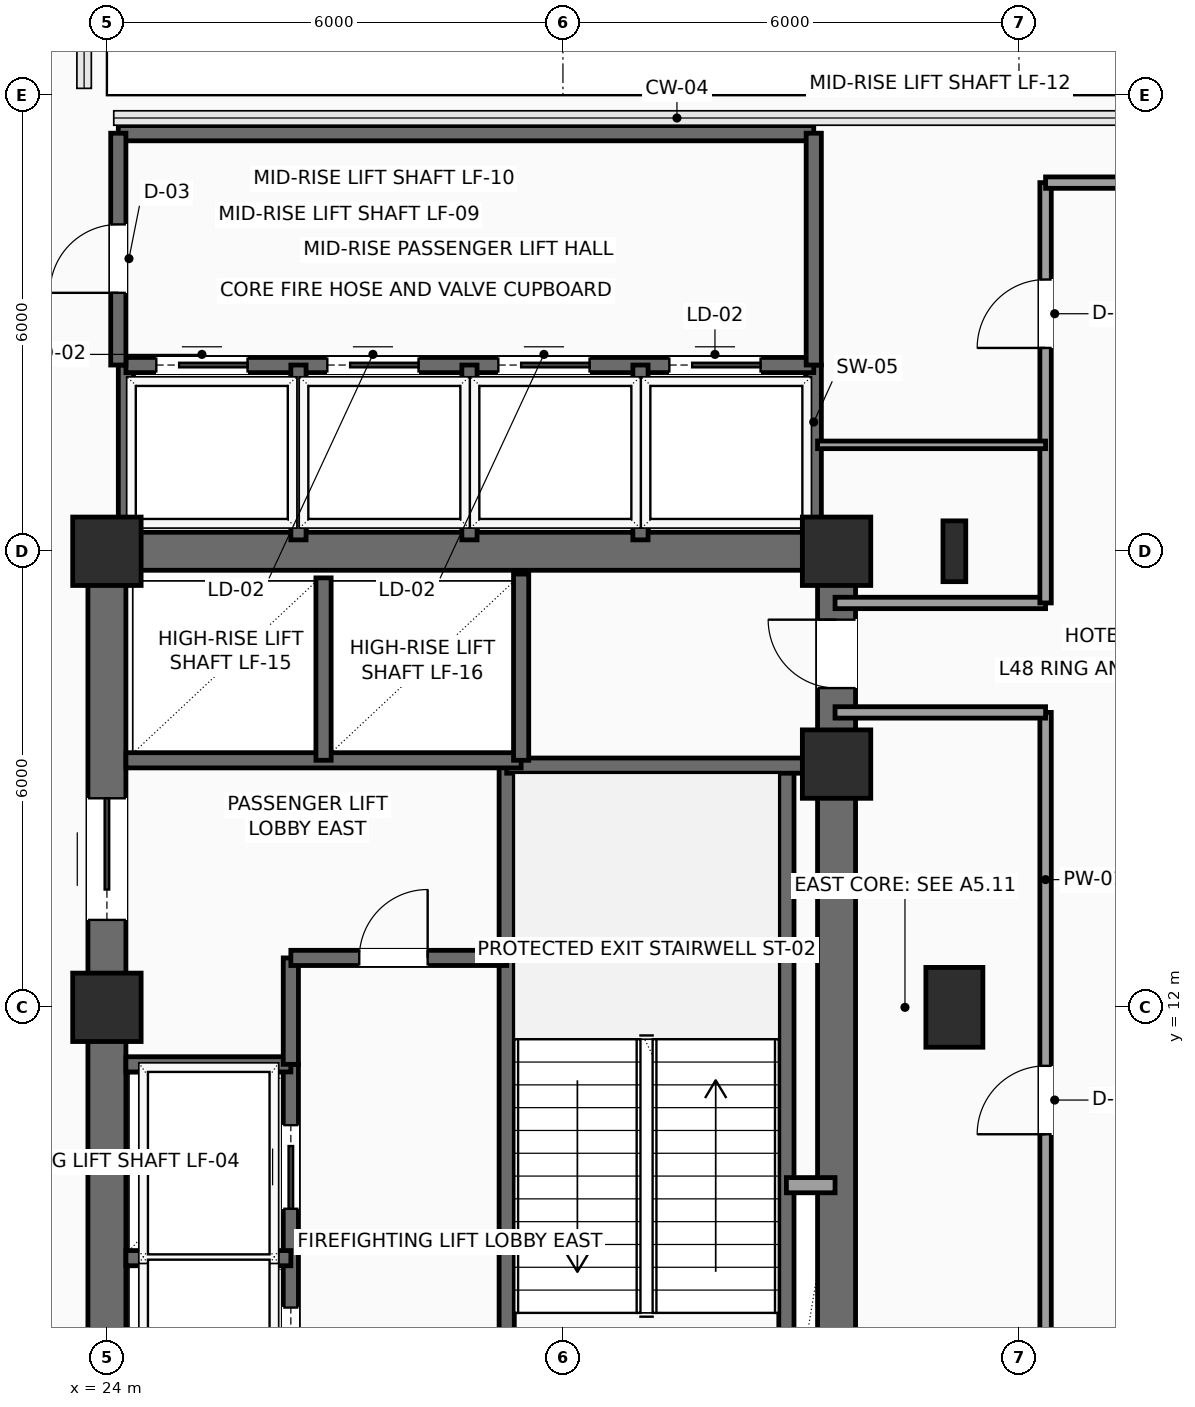
"""IFC4 building model, lengths in metres.
Left out: names, types, materials, properties, quantities, classifications, styles, units other than length and angle.
Written with IfcOpenShell. Run it as: python <this file> out.ifc"""

import sys

from ifc_helpers import new_model, si_unit, direction, frame, frame_2d, origin, origin_2d, place, context, subcontext, project, spatial, rectangle, i_section, extrude, element, fill, save


model = new_model("IFC4")
c1 = context("Model", 3, precision=1e-05, world=origin(), true_north=direction((0.0, 1.0)))
c2 = subcontext(c1, "Body", "Model", "MODEL_VIEW")
j1 = project(units=[si_unit("LENGTHUNIT", "METRE"), si_unit("PLANEANGLEUNIT", "RADIAN")], contexts=[c1])
p1 = place(None, origin())
s1 = spatial("IfcSite", under=j1, at=p1, CompositionType="ELEMENT")
p2 = place(p1, origin())
s2 = spatial("IfcBuilding", under=s1, at=p2, CompositionType="ELEMENT")
p3 = place(p2, frame((0.0, 0.0, 195.45)))
s3 = spatial("IfcBuildingStorey", under=s2, at=p3, CompositionType="ELEMENT", Elevation=195.45)
for number, where, z_axis, x_axis in (
    (1, (24.0, 12.0, 0.0), (0.0, 0.0, 1.0), (1.0, 0.0, 0.0)),
    (2, (24.0, 18.0, 0.0), (0.0, 0.0, 1.0), (1.0, 0.0, 0.0)),
    (3, (33.6, 15.2, 0.0), (0.0, 0.0, 1.0), (1.0, 0.0, 0.0)),
    (4, (33.6, 18.0, 0.0), (0.0, 0.0, 1.0), (1.0, 0.0, 0.0)),
):
    element("IfcColumn", number, at=place(p3, frame(where, z_axis=z_axis, x_axis=x_axis)), inside=s3, PredefinedType="COLUMN", context=c2, shape_type="SweptSolid", body=[
        extrude(rectangle(XDim=0.9, YDim=0.9, at=origin_2d()), origin(), (0.0, 0.0, 1.0), 3.75),
    ])
p4 = place(p3, frame((35.15, 12.0, 0.0), z_axis=(0.0, 0.0, 1.0), x_axis=(1.0, 0.0, 0.0)))
e5 = element("IfcColumn", 5, at=p4, inside=s3, PredefinedType="COLUMN", context=c2, shape_type="SweptSolid", body=[
    extrude(rectangle(XDim=0.75, YDim=1.05, at=origin_2d()), origin(), (0.0, 0.0, 1.0), 3.75),
])
p5 = place(p3, frame((35.15, 18.0, 0.0), z_axis=(0.0, 0.0, 1.0), x_axis=(1.0, 0.0, 0.0)))
e6 = element("IfcColumn", 6, at=p5, inside=s3, PredefinedType="COLUMN", context=c2, shape_type="SweptSolid", body=[
    extrude(i_section(OverallWidth=0.3, OverallDepth=0.8, WebThickness=0.018, FlangeThickness=0.033, FilletRadius=0.03, at=origin_2d()), origin(), (0.0, 0.0, 1.0), 3.75),
])
p6 = place(p3, frame((24.0, 18.0, 0.0), z_axis=(0.0, 0.0, 1.0), x_axis=(1.0, 0.0, 0.0)))
e7 = element("IfcWall", 7, at=p6, inside=s3, PredefinedType="SHEAR", context=c2, shape_type="SweptSolid", body=[
    extrude(rectangle(XDim=9.6, YDim=0.5, at=frame_2d((4.8, 0.0))), origin(), (0.0, 0.0, 1.0), 3.475),
])
p7 = place(p3, frame((24.0, 6.0, 0.0), z_axis=(0.0, 0.0, 1.0), x_axis=(0.0, 1.0, 0.0)))
e8 = element("IfcWall", 8, at=p7, inside=s3, PredefinedType="SHEAR", context=c2, shape_type="SweptSolid", body=[
    extrude(rectangle(XDim=12.0, YDim=0.5, at=frame_2d((6.0, 0.0))), origin(), (0.0, 0.0, 1.0), 3.475),
])
p8 = place(p7, frame((7.15, 0.0, 0.0)))
e9 = element("IfcOpeningElement", 9, at=p8, cuts=e8, PredefinedType="OPENING", context=c2, shape_type="SweptSolid", body=[
    extrude(rectangle(XDim=1.6, YDim=2.3, at=frame_2d((0.8, 1.15))), frame((0.0, 0.26, 0.0), z_axis=(0.0, -1.0, 0.0), x_axis=(1.0, 0.0, 0.0)), (0.0, 0.0, 1.0), 0.52),
])
p9 = place(p3, frame((33.6, 6.0, 0.0), z_axis=(0.0, 0.0, 1.0), x_axis=(0.0, 1.0, 0.0)))
e10 = element("IfcWall", 10, at=p9, inside=s3, PredefinedType="SHEAR", context=c2, shape_type="SweptSolid", body=[
    extrude(rectangle(XDim=12.0, YDim=0.5, at=frame_2d((6.0, 0.0))), origin(), (0.0, 0.0, 1.0), 3.475),
])
p10 = place(p9, frame((10.2, 0.0, 0.0)))
e11 = element("IfcOpeningElement", 11, at=p10, cuts=e10, PredefinedType="OPENING", context=c2, shape_type="SweptSolid", body=[
    extrude(rectangle(XDim=0.9, YDim=2.15, at=frame_2d((0.45, 1.075))), frame((0.0, 0.26, 0.0), z_axis=(0.0, -1.0, 0.0), x_axis=(1.0, 0.0, 0.0)), (0.0, 0.0, 1.0), 0.52),
])
p11 = place(p3, frame((29.26, 6.3, 0.0), z_axis=(0.0, 0.0, 1.0), x_axis=(0.0, 1.0, 0.0)))
e12 = element("IfcWall", 12, at=p11, inside=s3, PredefinedType="SHEAR", context=c2, shape_type="SweptSolid", body=[
    extrude(rectangle(XDim=8.88, YDim=0.2, at=frame_2d((4.44, 0.0))), origin(), (0.0, 0.0, 1.0), 3.475),
])
p12 = place(p11, frame((0.35, 0.0, 0.0)))
e13 = element("IfcOpeningElement", 13, at=p12, cuts=e12, PredefinedType="OPENING", context=c2, shape_type="SweptSolid", body=[
    extrude(rectangle(XDim=1.1, YDim=2.2, at=frame_2d((0.55, 1.1))), frame((0.0, 0.11, 0.0), z_axis=(0.0, -1.0, 0.0), x_axis=(1.0, 0.0, 0.0)), (0.0, 0.0, 1.0), 0.22),
])
p13 = place(p3, frame((32.94, 6.3, 0.0), z_axis=(0.0, 0.0, 1.0), x_axis=(0.0, 1.0, 0.0)))
e14 = element("IfcWall", 14, at=p13, inside=s3, PredefinedType="SHEAR", context=c2, shape_type="SweptSolid", body=[
    extrude(rectangle(XDim=8.88, YDim=0.2, at=frame_2d((4.44, 0.0))), origin(), (0.0, 0.0, 1.0), 3.475),
])
p14 = place(p3, frame((29.26, 15.18, 0.0), z_axis=(0.0, 0.0, 1.0), x_axis=(1.0, 0.0, 0.0)))
e15 = element("IfcWall", 15, at=p14, inside=s3, PredefinedType="SHEAR", context=c2, shape_type="SweptSolid", body=[
    extrude(rectangle(XDim=4.04, YDim=0.2, at=frame_2d((2.02, 0.0))), origin(), (0.0, 0.0, 1.0), 3.475),
])
p15 = place(p3, frame((26.42, 6.3, 0.0), z_axis=(0.0, 0.0, 1.0), x_axis=(0.0, 1.0, 0.0)))
e16 = element("IfcWall", 16, at=p15, inside=s3, PredefinedType="SHEAR", context=c2, shape_type="SweptSolid", body=[
    extrude(rectangle(XDim=4.95, YDim=0.2, at=frame_2d((2.475, 0.0))), origin(), (0.0, 0.0, 1.0), 3.475),
])
p16 = place(p15, frame((0.65, 0.0, 0.0)))
e17 = element("IfcOpeningElement", 17, at=p16, cuts=e16, PredefinedType="OPENING", context=c2, shape_type="SweptSolid", body=[
    extrude(rectangle(XDim=1.1, YDim=2.2, at=frame_2d((0.55, 1.1))), frame((0.0, 0.11, 0.0), z_axis=(0.0, -1.0, 0.0), x_axis=(1.0, 0.0, 0.0)), (0.0, 0.0, 1.0), 0.22),
])
p17 = place(p15, frame((3.05, 0.0, 0.0)))
e18 = element("IfcOpeningElement", 18, at=p17, cuts=e16, PredefinedType="OPENING", context=c2, shape_type="SweptSolid", body=[
    extrude(rectangle(XDim=1.1, YDim=2.2, at=frame_2d((0.55, 1.1))), frame((0.0, 0.11, 0.0), z_axis=(0.0, -1.0, 0.0), x_axis=(1.0, 0.0, 0.0)), (0.0, 0.0, 1.0), 0.22),
])
for number, where, z_axis, x_axis in (
    (19, (24.25, 8.7, 0.0), (0.0, 0.0, 1.0), (1.0, 0.0, 0.0)),
    (20, (24.25, 11.25, 0.0), (0.0, 0.0, 1.0), (1.0, 0.0, 0.0)),
):
    element("IfcWall", number, at=place(p3, frame(where, z_axis=z_axis, x_axis=x_axis)), inside=s3, PredefinedType="SHEAR", context=c2, shape_type="SweptSolid", body=[
        extrude(rectangle(XDim=2.17, YDim=0.2, at=frame_2d((1.085, 0.0))), origin(), (0.0, 0.0, 1.0), 3.475),
    ])
p18 = place(p3, frame((26.42, 11.25, 0.0), z_axis=(0.0, 0.0, 1.0), x_axis=(0.0, 1.0, 0.0)))
e21 = element("IfcWall", 21, at=p18, inside=s3, PredefinedType="SHEAR", context=c2, shape_type="SweptSolid", body=[
    extrude(rectangle(XDim=1.4, YDim=0.2, at=frame_2d((0.7, 0.0))), origin(), (0.0, 0.0, 1.0), 3.475),
])
p19 = place(p3, frame((26.42, 12.65, 0.0), z_axis=(0.0, 0.0, 1.0), x_axis=(1.0, 0.0, 0.0)))
e22 = element("IfcWall", 22, at=p19, inside=s3, PredefinedType="SHEAR", context=c2, shape_type="SweptSolid", body=[
    extrude(rectangle(XDim=2.84, YDim=0.2, at=frame_2d((1.42, 0.0))), origin(), (0.0, 0.0, 1.0), 3.475),
])
p20 = place(p19, frame((0.9, 0.0, 0.0)))
e23 = element("IfcOpeningElement", 23, at=p20, cuts=e22, PredefinedType="OPENING", context=c2, shape_type="SweptSolid", body=[
    extrude(rectangle(XDim=0.9, YDim=2.15, at=frame_2d((0.45, 1.075))), frame((0.0, 0.11, 0.0), z_axis=(0.0, -1.0, 0.0), x_axis=(1.0, 0.0, 0.0)), (0.0, 0.0, 1.0), 0.22),
])
p21 = place(p3, frame((32.94, 9.66, 0.0), z_axis=(0.0, 0.0, 1.0), x_axis=(1.0, 0.0, 0.0)))
e24 = element("IfcWall", 24, at=p21, inside=s3, PredefinedType="SOLIDWALL", context=c2, shape_type="SweptSolid", body=[
    extrude(rectangle(XDim=0.64, YDim=0.2, at=frame_2d((0.32, 0.0))), origin(), (0.0, 0.0, 1.0), 3.475),
])
p22 = place(p3, frame((24.25, 15.25, 0.0), z_axis=(0.0, 0.0, 1.0), x_axis=(1.0, 0.0, 0.0)))
e25 = element("IfcWall", 25, at=p22, inside=s3, PredefinedType="SHEAR", context=c2, shape_type="SweptSolid", body=[
    extrude(rectangle(XDim=5.2, YDim=0.2, at=frame_2d((2.6, 0.0))), origin(), (0.0, 0.0, 1.0), 3.475),
])
p23 = place(p3, frame((26.85, 15.25, 0.0), z_axis=(0.0, 0.0, 1.0), x_axis=(0.0, 1.0, 0.0)))
e26 = element("IfcWall", 26, at=p23, inside=s3, PredefinedType="SHEAR", context=c2, shape_type="SweptSolid", body=[
    extrude(rectangle(XDim=2.4, YDim=0.2, at=frame_2d((1.2, 0.0))), origin(), (0.0, 0.0, 1.0), 3.475),
])
p24 = place(p3, frame((29.45, 15.25, 0.0), z_axis=(0.0, 0.0, 1.0), x_axis=(0.0, 1.0, 0.0)))
e27 = element("IfcWall", 27, at=p24, inside=s3, PredefinedType="SHEAR", context=c2, shape_type="SweptSolid", body=[
    extrude(rectangle(XDim=2.45, YDim=0.2, at=frame_2d((1.225, 0.0))), origin(), (0.0, 0.0, 1.0), 3.475),
])
for number, where, z_axis, x_axis in (
    (28, (33.3, 18.1, 0.0), (0.0, 0.0, 1.0), (0.0, 1.0, 0.0)),
    (29, (24.25, 18.1, 0.0), (0.0, 0.0, 1.0), (0.0, 1.0, 0.0)),
):
    element("IfcWall", number, at=place(p3, frame(where, z_axis=z_axis, x_axis=x_axis)), inside=s3, PredefinedType="SHEAR", context=c2, shape_type="SweptSolid", body=[
        extrude(rectangle(XDim=2.35, YDim=0.2, at=frame_2d((1.175, 0.0))), origin(), (0.0, 0.0, 1.0), 3.475),
    ])
p25 = place(p3, frame((24.25, 20.45, 0.0), z_axis=(0.0, 0.0, 1.0), x_axis=(1.0, 0.0, 0.0)))
e30 = element("IfcWall", 30, at=p25, inside=s3, PredefinedType="SHEAR", context=c2, shape_type="SweptSolid", body=[
    extrude(rectangle(XDim=9.05, YDim=0.2, at=frame_2d((4.525, 0.0))), origin(), (0.0, 0.0, 1.0), 3.475),
])
p26 = place(p25, frame((0.4, 0.0, 0.0)))
e31 = element("IfcOpeningElement", 31, at=p26, cuts=e30, PredefinedType="OPENING", context=c2, shape_type="SweptSolid", body=[
    extrude(rectangle(XDim=1.2, YDim=2.2, at=frame_2d((0.6, 1.1))), frame((0.0, 0.11, 0.0), z_axis=(0.0, -1.0, 0.0), x_axis=(1.0, 0.0, 0.0)), (0.0, 0.0, 1.0), 0.22),
])
p27 = place(p25, frame((2.65, 0.0, 0.0)))
e32 = element("IfcOpeningElement", 32, at=p27, cuts=e30, PredefinedType="OPENING", context=c2, shape_type="SweptSolid", body=[
    extrude(rectangle(XDim=1.2, YDim=2.2, at=frame_2d((0.6, 1.1))), frame((0.0, 0.11, 0.0), z_axis=(0.0, -1.0, 0.0), x_axis=(1.0, 0.0, 0.0)), (0.0, 0.0, 1.0), 0.22),
])
p28 = place(p25, frame((4.9, 0.0, 0.0)))
e33 = element("IfcOpeningElement", 33, at=p28, cuts=e30, PredefinedType="OPENING", context=c2, shape_type="SweptSolid", body=[
    extrude(rectangle(XDim=1.2, YDim=2.2, at=frame_2d((0.6, 1.1))), frame((0.0, 0.11, 0.0), z_axis=(0.0, -1.0, 0.0), x_axis=(1.0, 0.0, 0.0)), (0.0, 0.0, 1.0), 0.22),
])
p29 = place(p25, frame((7.15, 0.0, 0.0)))
e34 = element("IfcOpeningElement", 34, at=p29, cuts=e30, PredefinedType="OPENING", context=c2, shape_type="SweptSolid", body=[
    extrude(rectangle(XDim=1.2, YDim=2.2, at=frame_2d((0.6, 1.1))), frame((0.0, 0.11, 0.0), z_axis=(0.0, -1.0, 0.0), x_axis=(1.0, 0.0, 0.0)), (0.0, 0.0, 1.0), 0.22),
])
for number, where, z_axis, x_axis in (
    (35, (26.52, 18.15, 0.0), (0.0, 0.0, 1.0), (0.0, 1.0, 0.0)),
    (36, (28.77, 18.15, 0.0), (0.0, 0.0, 1.0), (0.0, 1.0, 0.0)),
    (37, (31.02, 18.15, 0.0), (0.0, 0.0, 1.0), (0.0, 1.0, 0.0)),
):
    element("IfcWall", number, at=place(p3, frame(where, z_axis=z_axis, x_axis=x_axis)), inside=s3, PredefinedType="SHEAR", context=c2, shape_type="SweptSolid", body=[
        extrude(rectangle(XDim=2.3, YDim=0.2, at=frame_2d((1.15, 0.0))), origin(), (0.0, 0.0, 1.0), 3.475),
    ])
p30 = place(p3, frame((24.15, 23.5, 0.0), z_axis=(0.0, 0.0, 1.0), x_axis=(1.0, 0.0, 0.0)))
e38 = element("IfcWall", 38, at=p30, inside=s3, PredefinedType="SHEAR", context=c2, shape_type="SweptSolid", body=[
    extrude(rectangle(XDim=9.15, YDim=0.2, at=frame_2d((4.575, 0.0))), origin(), (0.0, 0.0, 1.0), 3.475),
])
p31 = place(p3, frame((33.3, 20.45, 0.0), z_axis=(0.0, 0.0, 1.0), x_axis=(0.0, 1.0, 0.0)))
e39 = element("IfcWall", 39, at=p31, inside=s3, PredefinedType="SHEAR", context=c2, shape_type="SweptSolid", body=[
    extrude(rectangle(XDim=3.05, YDim=0.2, at=frame_2d((1.525, 0.0))), origin(), (0.0, 0.0, 1.0), 3.475),
])
p32 = place(p3, frame((24.15, 20.45, 0.0), z_axis=(0.0, 0.0, 1.0), x_axis=(0.0, 1.0, 0.0)))
e40 = element("IfcWall", 40, at=p32, inside=s3, PredefinedType="SHEAR", context=c2, shape_type="SweptSolid", body=[
    extrude(rectangle(XDim=3.05, YDim=0.2, at=frame_2d((1.525, 0.0))), origin(), (0.0, 0.0, 1.0), 3.475),
])
p33 = place(p32, frame((0.95, 0.0, 0.0)))
e41 = element("IfcOpeningElement", 41, at=p33, cuts=e40, PredefinedType="OPENING", context=c2, shape_type="SweptSolid", body=[
    extrude(rectangle(XDim=0.9, YDim=2.15, at=frame_2d((0.45, 1.075))), frame((0.0, 0.11, 0.0), z_axis=(0.0, -1.0, 0.0), x_axis=(1.0, 0.0, 0.0)), (0.0, 0.0, 1.0), 0.22),
])
p34 = place(p3, frame((36.35, 5.8, 0.0), z_axis=(0.0, 0.0, 1.0), x_axis=(0.0, 1.0, 0.0)))
e42 = element("IfcWall", 42, at=p34, inside=s3, PredefinedType="PARTITIONING", context=c2, shape_type="SweptSolid", body=[
    extrude(rectangle(XDim=10.08, YDim=0.15, at=frame_2d((5.04, 0.0))), origin(), (0.0, 0.0, 1.0), 3.475),
])
p35 = place(p34, frame((4.53, 0.0, 0.0)))
e43 = element("IfcOpeningElement", 43, at=p35, cuts=e42, PredefinedType="OPENING", context=c2, shape_type="SweptSolid", body=[
    extrude(rectangle(XDim=0.9, YDim=2.1, at=frame_2d((0.45, 1.05))), frame((0.0, 0.085, 0.0), z_axis=(0.0, -1.0, 0.0), x_axis=(1.0, 0.0, 0.0)), (0.0, 0.0, 1.0), 0.17),
])
for number, where, z_axis, x_axis in (
    (44, (36.35, 15.88, 0.0), (0.0, 0.0, 1.0), (-1.0, 0.0, 0.0)),
    (45, (33.58, 17.32, 0.0), (0.0, 0.0, 1.0), (1.0, 0.0, 0.0)),
):
    element("IfcWall", number, at=place(p3, frame(where, z_axis=z_axis, x_axis=x_axis)), inside=s3, PredefinedType="PARTITIONING", context=c2, shape_type="SweptSolid", body=[
        extrude(rectangle(XDim=2.77, YDim=0.15, at=frame_2d((1.385, 0.0))), origin(), (0.0, 0.0, 1.0), 3.475),
    ])
p36 = place(p3, frame((36.35, 17.32, 0.0), z_axis=(0.0, 0.0, 1.0), x_axis=(0.0, 1.0, 0.0)))
e46 = element("IfcWall", 46, at=p36, inside=s3, PredefinedType="PARTITIONING", context=c2, shape_type="SweptSolid", body=[
    extrude(rectangle(XDim=5.53, YDim=0.15, at=frame_2d((2.765, 0.0))), origin(), (0.0, 0.0, 1.0), 3.475),
])
p37 = place(p36, frame((3.355, 0.0, 0.0)))
e47 = element("IfcOpeningElement", 47, at=p37, cuts=e46, PredefinedType="OPENING", context=c2, shape_type="SweptSolid", body=[
    extrude(rectangle(XDim=0.9, YDim=2.1, at=frame_2d((0.45, 1.05))), frame((0.0, 0.085, 0.0), z_axis=(0.0, -1.0, 0.0), x_axis=(1.0, 0.0, 0.0)), (0.0, 0.0, 1.0), 0.17),
])
p38 = place(p3, frame((36.35, 22.85, 0.0), z_axis=(0.0, 0.0, 1.0), x_axis=(1.0, 0.0, 0.0)))
e48 = element("IfcWall", 48, at=p38, inside=s3, PredefinedType="PARTITIONING", context=c2, shape_type="SweptSolid", body=[
    extrude(rectangle(XDim=2.1, YDim=0.15, at=frame_2d((1.05, 0.0))), origin(), (0.0, 0.0, 1.0), 3.475),
])
p39 = place(p3, frame((33.35, 19.4, 0.0), z_axis=(0.0, 0.0, 1.0), x_axis=(1.0, 0.0, 0.0)))
e49 = element("IfcWall", 49, at=p39, inside=s3, PredefinedType="PARTITIONING", context=c2, shape_type="SweptSolid", body=[
    extrude(rectangle(XDim=3.0, YDim=0.1, at=frame_2d((1.5, 0.0))), origin(), (0.0, 0.0, 1.0), 3.475),
])
p40 = place(p8, origin())
e50 = element("IfcDoor", 50, at=p40, inside=s3, OperationType="DOUBLE_DOOR_SLIDING", PredefinedType="DOOR", context=c2, shape_type="SweptSolid", body=[
    extrude(rectangle(XDim=1.6, YDim=2.3, at=frame_2d((0.8, 1.15))), frame((0.0, 0.025, 0.0), z_axis=(0.0, -1.0, 0.0), x_axis=(1.0, 0.0, 0.0)), (0.0, 0.0, 1.0), 0.05),
])
fill(e9, e50)
p41 = place(p10, origin())
e51 = element("IfcDoor", 51, at=p41, inside=s3, OperationType="SINGLE_SWING_RIGHT", PredefinedType="DOOR", context=c2, shape_type="SweptSolid", body=[
    extrude(rectangle(XDim=0.9, YDim=2.15, at=frame_2d((0.45, 1.075))), frame((0.0, 0.025, 0.0), z_axis=(0.0, -1.0, 0.0), x_axis=(1.0, 0.0, 0.0)), (0.0, 0.0, 1.0), 0.05),
])
fill(e11, e51)
p42 = place(p16, origin())
e52 = element("IfcDoor", 52, at=p42, inside=s3, OperationType="SLIDING_TO_LEFT", PredefinedType="DOOR", context=c2, shape_type="SweptSolid", body=[
    extrude(rectangle(XDim=1.1, YDim=2.2, at=frame_2d((0.55, 1.1))), frame((0.0, 0.025, 0.0), z_axis=(0.0, -1.0, 0.0), x_axis=(1.0, 0.0, 0.0)), (0.0, 0.0, 1.0), 0.05),
])
fill(e17, e52)
p43 = place(p17, origin())
e53 = element("IfcDoor", 53, at=p43, inside=s3, OperationType="SLIDING_TO_LEFT", PredefinedType="DOOR", context=c2, shape_type="SweptSolid", body=[
    extrude(rectangle(XDim=1.1, YDim=2.2, at=frame_2d((0.55, 1.1))), frame((0.0, 0.025, 0.0), z_axis=(0.0, -1.0, 0.0), x_axis=(1.0, 0.0, 0.0)), (0.0, 0.0, 1.0), 0.05),
])
fill(e18, e53)
p44 = place(p20, origin())
e54 = element("IfcDoor", 54, at=p44, inside=s3, OperationType="SINGLE_SWING_RIGHT", PredefinedType="DOOR", context=c2, shape_type="SweptSolid", body=[
    extrude(rectangle(XDim=0.9, YDim=2.15, at=frame_2d((0.45, 1.075))), frame((0.0, 0.025, 0.0), z_axis=(0.0, -1.0, 0.0), x_axis=(1.0, 0.0, 0.0)), (0.0, 0.0, 1.0), 0.05),
])
fill(e23, e54)
p45 = place(p26, origin())
e55 = element("IfcDoor", 55, at=p45, inside=s3, OperationType="SLIDING_TO_RIGHT", PredefinedType="DOOR", context=c2, shape_type="SweptSolid", body=[
    extrude(rectangle(XDim=1.2, YDim=2.2, at=frame_2d((0.6, 1.1))), frame((0.0, 0.025, 0.0), z_axis=(0.0, -1.0, 0.0), x_axis=(1.0, 0.0, 0.0)), (0.0, 0.0, 1.0), 0.05),
])
fill(e31, e55)
p46 = place(p27, origin())
e56 = element("IfcDoor", 56, at=p46, inside=s3, OperationType="SLIDING_TO_RIGHT", PredefinedType="DOOR", context=c2, shape_type="SweptSolid", body=[
    extrude(rectangle(XDim=1.2, YDim=2.2, at=frame_2d((0.6, 1.1))), frame((0.0, 0.025, 0.0), z_axis=(0.0, -1.0, 0.0), x_axis=(1.0, 0.0, 0.0)), (0.0, 0.0, 1.0), 0.05),
])
fill(e32, e56)
p47 = place(p28, origin())
e57 = element("IfcDoor", 57, at=p47, inside=s3, OperationType="SLIDING_TO_RIGHT", PredefinedType="DOOR", context=c2, shape_type="SweptSolid", body=[
    extrude(rectangle(XDim=1.2, YDim=2.2, at=frame_2d((0.6, 1.1))), frame((0.0, 0.025, 0.0), z_axis=(0.0, -1.0, 0.0), x_axis=(1.0, 0.0, 0.0)), (0.0, 0.0, 1.0), 0.05),
])
fill(e33, e57)
p48 = place(p29, origin())
e58 = element("IfcDoor", 58, at=p48, inside=s3, OperationType="SLIDING_TO_RIGHT", PredefinedType="DOOR", context=c2, shape_type="SweptSolid", body=[
    extrude(rectangle(XDim=1.2, YDim=2.2, at=frame_2d((0.6, 1.1))), frame((0.0, 0.025, 0.0), z_axis=(0.0, -1.0, 0.0), x_axis=(1.0, 0.0, 0.0)), (0.0, 0.0, 1.0), 0.05),
])
fill(e34, e58)
p49 = place(p33, origin())
e59 = element("IfcDoor", 59, at=p49, inside=s3, OperationType="SINGLE_SWING_LEFT", PredefinedType="DOOR", context=c2, shape_type="SweptSolid", body=[
    extrude(rectangle(XDim=0.9, YDim=2.15, at=frame_2d((0.45, 1.075))), frame((0.0, 0.025, 0.0), z_axis=(0.0, -1.0, 0.0), x_axis=(1.0, 0.0, 0.0)), (0.0, 0.0, 1.0), 0.05),
])
fill(e41, e59)
p50 = place(p35, origin())
e60 = element("IfcDoor", 60, at=p50, inside=s3, OperationType="SINGLE_SWING_LEFT", PredefinedType="DOOR", context=c2, shape_type="SweptSolid", body=[
    extrude(rectangle(XDim=0.9, YDim=2.1, at=frame_2d((0.45, 1.05))), frame((0.0, 0.025, 0.0), z_axis=(0.0, -1.0, 0.0), x_axis=(1.0, 0.0, 0.0)), (0.0, 0.0, 1.0), 0.05),
])
fill(e43, e60)
p51 = place(p37, origin())
e61 = element("IfcDoor", 61, at=p51, inside=s3, OperationType="SINGLE_SWING_LEFT", PredefinedType="DOOR", context=c2, shape_type="SweptSolid", body=[
    extrude(rectangle(XDim=0.9, YDim=2.1, at=frame_2d((0.45, 1.05))), frame((0.0, 0.025, 0.0), z_axis=(0.0, -1.0, 0.0), x_axis=(1.0, 0.0, 0.0)), (0.0, 0.0, 1.0), 0.05),
])
fill(e47, e61)
save(model, sys.argv[1])
